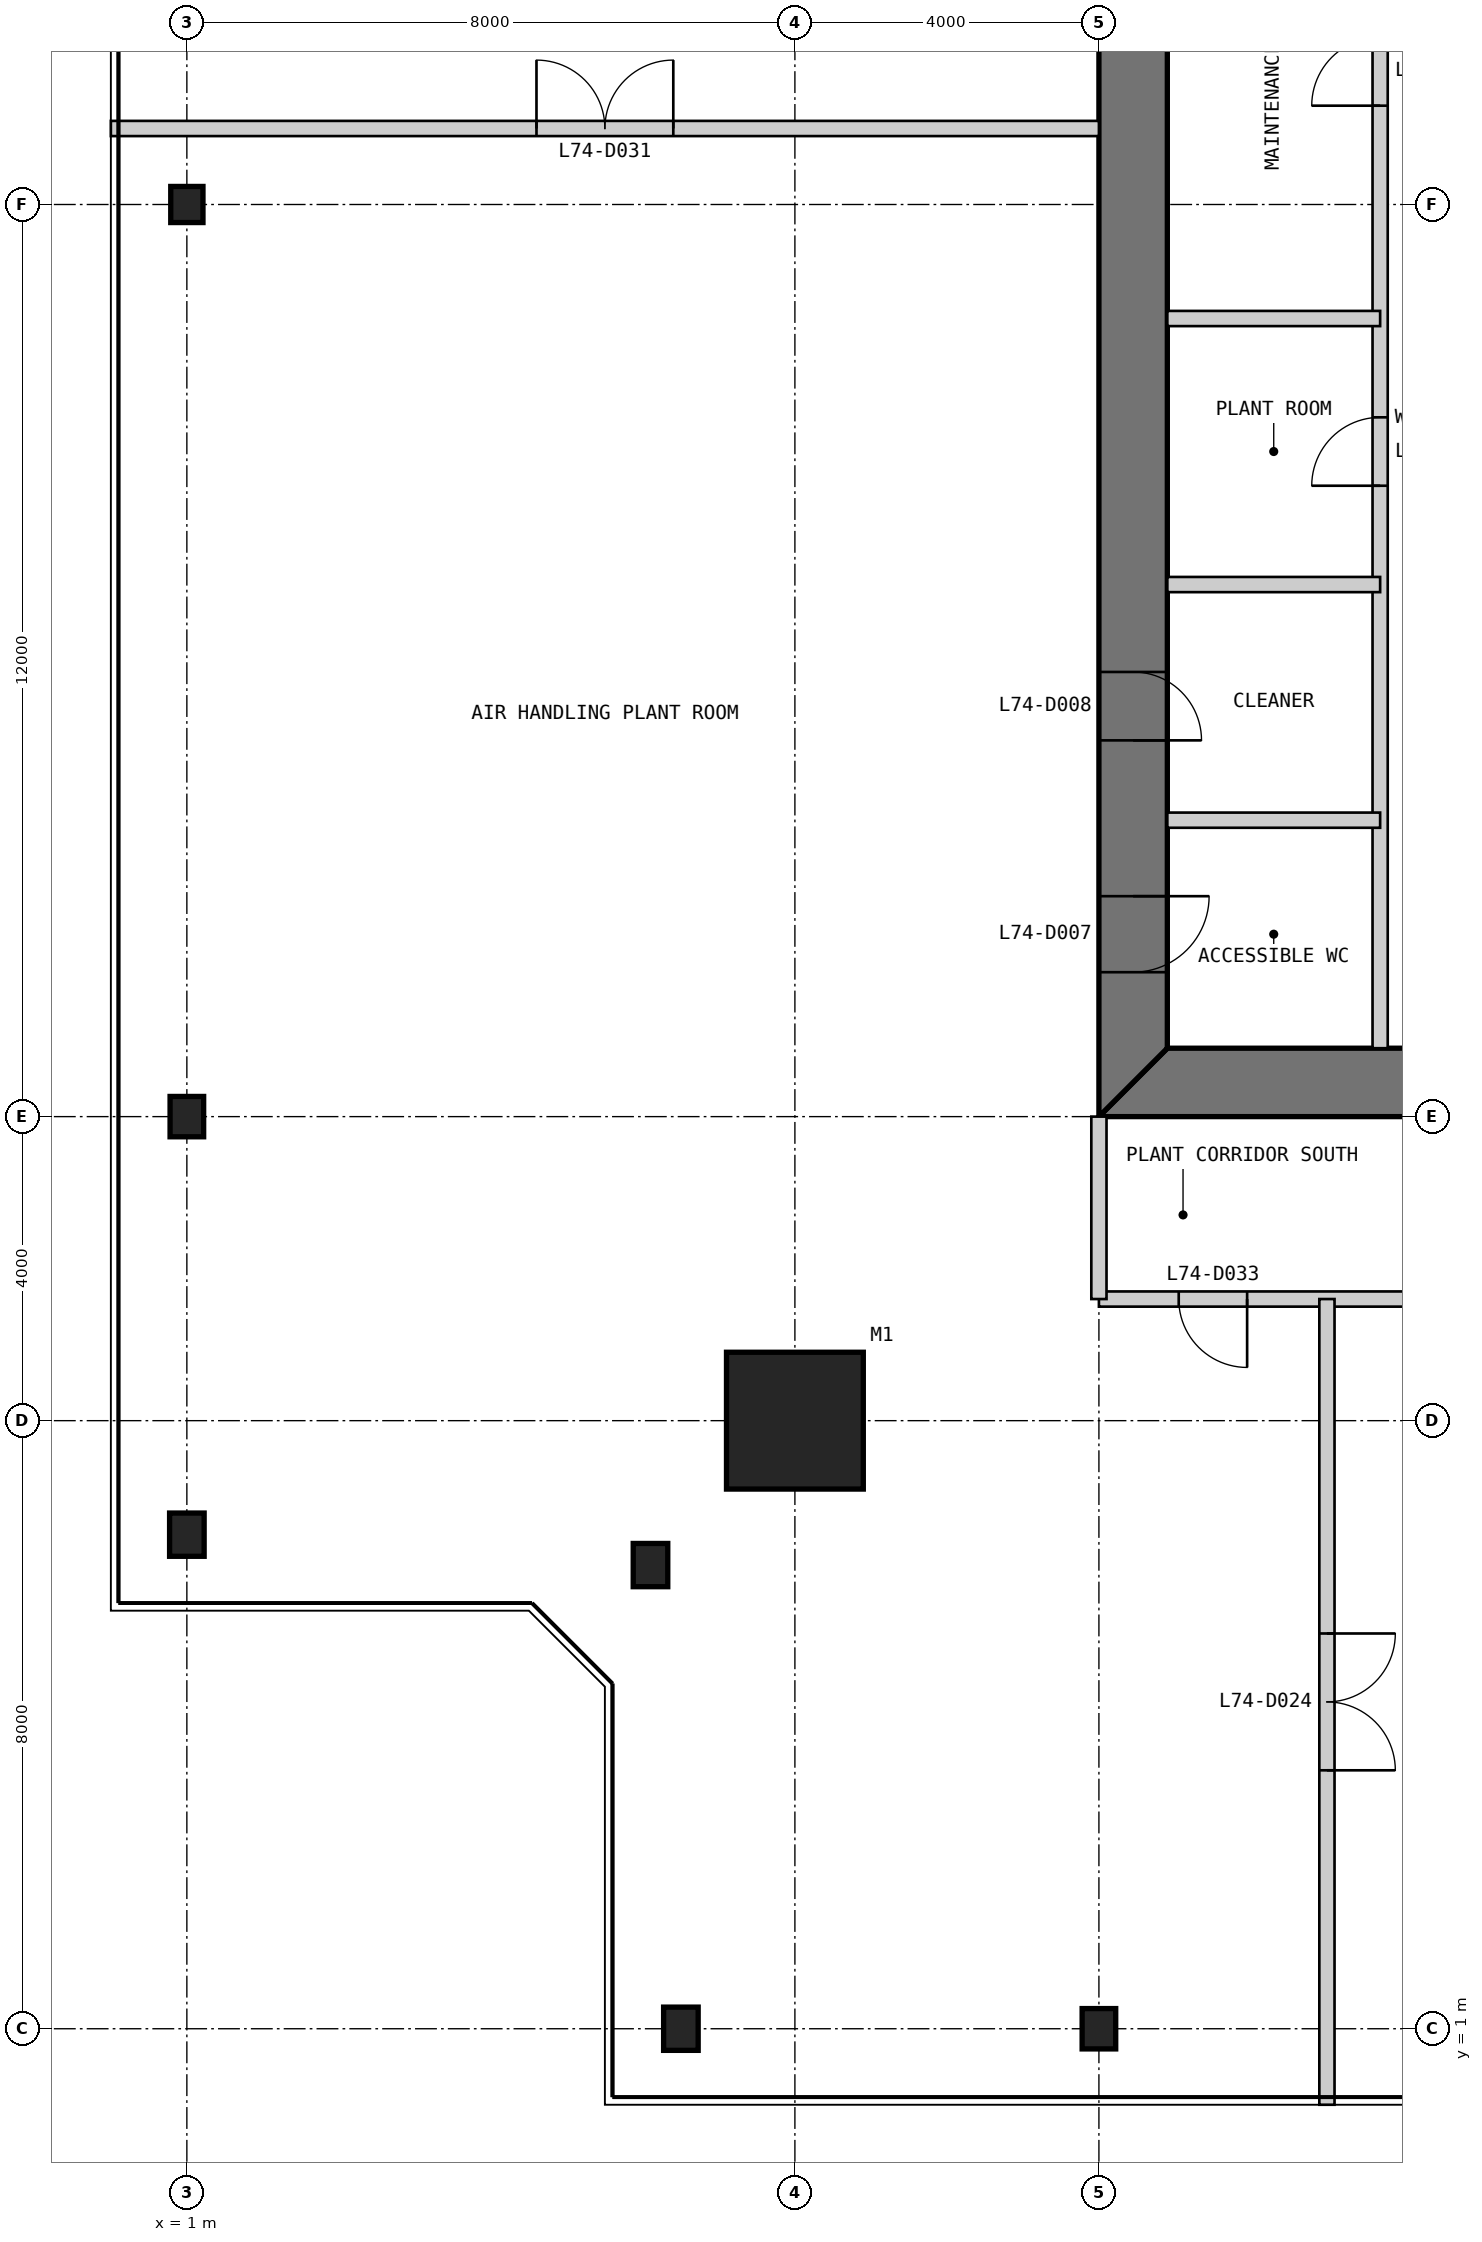
"""IFC4 building model, lengths in metres.
Left out: names, types, materials, properties, quantities, classifications, styles, units other than length and angle.
Written with IfcOpenShell. Run it as: python <this file> out.ifc"""

import sys

from ifc_helpers import new_model, si_unit, direction, frame, frame_2d, origin, origin_2d, place, context, subcontext, project, spatial, polyline, rectangle, i_section, outline, extrude, element, fill, save


model = new_model("IFC4")
c1 = context("Model", 3, precision=1e-05, world=origin(), true_north=direction((0.0, 1.0)))
c2 = subcontext(c1, "Body", "Model", "MODEL_VIEW")
j1 = project(units=[si_unit("LENGTHUNIT", "METRE"), si_unit("PLANEANGLEUNIT", "RADIAN")], contexts=[c1])
p1 = place(None, origin())
s1 = spatial("IfcSite", under=j1, at=p1, CompositionType="ELEMENT")
p2 = place(p1, origin())
s2 = spatial("IfcBuilding", under=s1, at=p2, CompositionType="ELEMENT")
p3 = place(p2, frame((0.0, 0.0, 307.8)))
s3 = spatial("IfcBuildingStorey", under=s2, at=p3, CompositionType="ELEMENT", Elevation=307.8)
p4 = place(p3, frame((9.0, 9.0, 0.0), z_axis=(0.0, 0.0, 1.0), x_axis=(1.0, 0.0, 0.0)))
e1 = element("IfcColumn", 1, at=p4, inside=s3, PredefinedType="COLUMN", context=c2, shape_type="SweptSolid", body=[
    extrude(rectangle(XDim=1.8, YDim=1.8, at=origin_2d()), origin(), (0.0, 0.0, 1.0), 5.75),
])
p5 = place(p3, frame((7.5, 1.0, 0.0), z_axis=(0.0, 0.0, 1.0), x_axis=(1.0, 0.0, 0.0)))
e2 = element("IfcColumn", 2, at=p5, inside=s3, PredefinedType="COLUMN", context=c2, shape_type="SweptSolid", body=[
    extrude(i_section(OverallWidth=0.455, OverallDepth=0.569, WebThickness=0.078, FlangeThickness=0.125, at=origin_2d()), origin(), (0.0, 0.0, 1.0), 5.75),
])
p6 = place(p3, frame((13.0, 1.0, 0.0), z_axis=(0.0, 0.0, 1.0), x_axis=(1.0, 0.0, 0.0)))
e3 = element("IfcColumn", 3, at=p6, inside=s3, PredefinedType="COLUMN", context=c2, shape_type="SweptSolid", body=[
    extrude(i_section(OverallWidth=0.442, OverallDepth=0.531, WebThickness=0.066, FlangeThickness=0.106, at=origin_2d()), origin(), (0.0, 0.0, 1.0), 5.75),
])
p7 = place(p3, frame((1.0, 25.0, 0.0), z_axis=(0.0, 0.0, 1.0), x_axis=(1.0, 0.0, 0.0)))
e4 = element("IfcColumn", 4, at=p7, inside=s3, PredefinedType="COLUMN", context=c2, shape_type="SweptSolid", body=[
    extrude(i_section(OverallWidth=0.424, OverallDepth=0.475, WebThickness=0.048, FlangeThickness=0.077, at=origin_2d()), origin(), (0.0, 0.0, 1.0), 5.75),
])
p8 = place(p3, frame((1.0, 13.0, 0.0), z_axis=(0.0, 0.0, 1.0), x_axis=(1.0, 0.0, 0.0)))
e5 = element("IfcColumn", 5, at=p8, inside=s3, PredefinedType="COLUMN", context=c2, shape_type="SweptSolid", body=[
    extrude(i_section(OverallWidth=0.442, OverallDepth=0.531, WebThickness=0.066, FlangeThickness=0.106, at=origin_2d()), origin(), (0.0, 0.0, 1.0), 5.75),
])
for number, where, z_axis, x_axis in (
    (6, (1.0, 7.5, 0.0), (0.0, 0.0, 1.0), (1.0, 0.0, 0.0)),
    (7, (7.1, 7.1, 0.0), (0.0, 0.0, 1.0), (1.0, 0.0, 0.0)),
):
    element("IfcColumn", number, at=place(p3, frame(where, z_axis=z_axis, x_axis=x_axis)), inside=s3, PredefinedType="COLUMN", context=c2, shape_type="SweptSolid", body=[
        extrude(i_section(OverallWidth=0.455, OverallDepth=0.569, WebThickness=0.078, FlangeThickness=0.125, at=origin_2d()), origin(), (0.0, 0.0, 1.0), 5.75),
    ])
p9 = place(p3, frame((13.0, 13.45, 0.0), z_axis=(0.0, 0.0, 1.0), x_axis=(1.0, 0.0, 0.0)))
e8 = element("IfcWall", 8, at=p9, inside=s3, PredefinedType="SHEAR", context=c2, shape_type="SweptSolid", body=[
    extrude(outline(polyline([(0.0, -0.45), (24.0, -0.45), (23.1, 0.45), (0.9, 0.45), (0.0, -0.45)])), origin(), (0.0, 0.0, 1.0), 5.75),
])
p10 = place(p9, frame((4.9, 0.0, 0.0)))
e9 = element("IfcOpeningElement", 9, at=p10, cuts=e8, PredefinedType="OPENING", context=c2, shape_type="SweptSolid", body=[
    extrude(rectangle(XDim=1.0, YDim=2.2, at=frame_2d((0.5, 1.1))), frame((0.0, 0.46, 0.0), z_axis=(0.0, -1.0, 0.0), x_axis=(1.0, 0.0, 0.0)), (0.0, 0.0, 1.0), 0.92),
])
p11 = place(p9, frame((8.9, 0.0, 0.0)))
e10 = element("IfcOpeningElement", 10, at=p11, cuts=e8, PredefinedType="OPENING", context=c2, shape_type="SweptSolid", body=[
    extrude(rectangle(XDim=1.1, YDim=2.2, at=frame_2d((0.55, 1.1))), frame((0.0, 0.46, 0.0), z_axis=(0.0, -1.0, 0.0), x_axis=(1.0, 0.0, 0.0)), (0.0, 0.0, 1.0), 0.92),
])
p12 = place(p9, frame((15.05, 0.0, 0.0)))
e11 = element("IfcOpeningElement", 11, at=p12, cuts=e8, PredefinedType="OPENING", context=c2, shape_type="SweptSolid", body=[
    extrude(rectangle(XDim=0.9, YDim=2.2, at=frame_2d((0.45, 1.1))), frame((0.0, 0.46, 0.0), z_axis=(0.0, -1.0, 0.0), x_axis=(1.0, 0.0, 0.0)), (0.0, 0.0, 1.0), 0.92),
])
p13 = place(p9, frame((17.9, 0.0, 0.0)))
e12 = element("IfcOpeningElement", 12, at=p13, cuts=e8, PredefinedType="OPENING", context=c2, shape_type="SweptSolid", body=[
    extrude(rectangle(XDim=1.0, YDim=2.2, at=frame_2d((0.5, 1.1))), frame((0.0, 0.46, 0.0), z_axis=(0.0, -1.0, 0.0), x_axis=(1.0, 0.0, 0.0)), (0.0, 0.0, 1.0), 0.92),
])
p14 = place(p9, frame((21.4, 0.0, 0.0)))
e13 = element("IfcOpeningElement", 13, at=p14, cuts=e8, PredefinedType="OPENING", context=c2, shape_type="SweptSolid", body=[
    extrude(rectangle(XDim=1.0, YDim=2.2, at=frame_2d((0.5, 1.1))), frame((0.0, 0.46, 0.0), z_axis=(0.0, -1.0, 0.0), x_axis=(1.0, 0.0, 0.0)), (0.0, 0.0, 1.0), 0.92),
])
p15 = place(p3, frame((13.45, 36.1, 0.0), z_axis=(0.0, 0.0, 1.0), x_axis=(0.0, -1.0, 0.0)))
e14 = element("IfcWall", 14, at=p15, inside=s3, PredefinedType="SHEAR", context=c2, shape_type="SweptSolid", body=[
    extrude(outline(polyline([(-0.9, -0.45), (23.1, -0.45), (22.2, 0.45), (0.0, 0.45), (-0.9, -0.45)])), origin(), (0.0, 0.0, 1.0), 5.75),
])
p16 = place(p15, frame((20.2, 0.0, 0.0)))
e15 = element("IfcOpeningElement", 15, at=p16, cuts=e14, PredefinedType="OPENING", context=c2, shape_type="SweptSolid", body=[
    extrude(rectangle(XDim=1.0, YDim=2.2, at=frame_2d((0.5, 1.1))), frame((0.0, 0.46, 0.0), z_axis=(0.0, -1.0, 0.0), x_axis=(1.0, 0.0, 0.0)), (0.0, 0.0, 1.0), 0.92),
])
p17 = place(p15, frame((17.25, 0.0, 0.0)))
e16 = element("IfcOpeningElement", 16, at=p17, cuts=e14, PredefinedType="OPENING", context=c2, shape_type="SweptSolid", body=[
    extrude(rectangle(XDim=0.9, YDim=2.2, at=frame_2d((0.45, 1.1))), frame((0.0, 0.46, 0.0), z_axis=(0.0, -1.0, 0.0), x_axis=(1.0, 0.0, 0.0)), (0.0, 0.0, 1.0), 0.92),
])
p18 = place(p3, frame((16.7, 13.9, 0.0), z_axis=(0.0, 0.0, 1.0), x_axis=(0.0, 1.0, 0.0)))
e17 = element("IfcWall", 17, at=p18, inside=s3, PredefinedType="PARTITIONING", context=c2, shape_type="SweptSolid", body=[
    extrude(rectangle(XDim=16.1, YDim=0.2, at=frame_2d((8.05, 0.0))), origin(), (0.0, 0.0, 1.0), 5.75),
])
p19 = place(p18, frame((7.4, 0.0, 0.0)))
e18 = element("IfcOpeningElement", 18, at=p19, cuts=e17, PredefinedType="OPENING", context=c2, shape_type="SweptSolid", body=[
    extrude(rectangle(XDim=0.9, YDim=2.2, at=frame_2d((0.45, 1.1))), frame((0.0, 0.11, 0.0), z_axis=(0.0, -1.0, 0.0), x_axis=(1.0, 0.0, 0.0)), (0.0, 0.0, 1.0), 0.22),
])
p20 = place(p18, frame((12.4, 0.0, 0.0)))
e19 = element("IfcOpeningElement", 19, at=p20, cuts=e17, PredefinedType="OPENING", context=c2, shape_type="SweptSolid", body=[
    extrude(rectangle(XDim=0.9, YDim=2.2, at=frame_2d((0.45, 1.1))), frame((0.0, 0.11, 0.0), z_axis=(0.0, -1.0, 0.0), x_axis=(1.0, 0.0, 0.0)), (0.0, 0.0, 1.0), 0.22),
])
for number, where, z_axis, x_axis in (
    (20, (13.9, 16.9, 0.0), (0.0, 0.0, 1.0), (1.0, 0.0, 0.0)),
    (21, (13.9, 20.0, 0.0), (0.0, 0.0, 1.0), (1.0, 0.0, 0.0)),
    (22, (13.9, 23.5, 0.0), (0.0, 0.0, 1.0), (1.0, 0.0, 0.0)),
):
    element("IfcWall", number, at=place(p3, frame(where, z_axis=z_axis, x_axis=x_axis)), inside=s3, PredefinedType="PARTITIONING", context=c2, shape_type="SweptSolid", body=[
        extrude(rectangle(XDim=2.8, YDim=0.2, at=frame_2d((1.4, 0.0))), origin(), (0.0, 0.0, 1.0), 5.75),
    ])
p21 = place(p3, frame((13.0, 10.6, 0.0), z_axis=(0.0, 0.0, 1.0), x_axis=(1.0, 0.0, 0.0)))
e23 = element("IfcWall", 23, at=p21, inside=s3, PredefinedType="PARTITIONING", context=c2, shape_type="SweptSolid", body=[
    extrude(rectangle(XDim=24.0, YDim=0.2, at=frame_2d((12.0, 0.0))), origin(), (0.0, 0.0, 1.0), 5.75),
])
p22 = place(p21, frame((1.05, 0.0, 0.0)))
e24 = element("IfcOpeningElement", 24, at=p22, cuts=e23, PredefinedType="OPENING", context=c2, shape_type="SweptSolid", body=[
    extrude(rectangle(XDim=0.9, YDim=2.2, at=frame_2d((0.45, 1.1))), frame((0.0, 0.11, 0.0), z_axis=(0.0, -1.0, 0.0), x_axis=(1.0, 0.0, 0.0)), (0.0, 0.0, 1.0), 0.22),
])
p23 = place(p21, frame((7.1, 0.0, 0.0)))
e25 = element("IfcOpeningElement", 25, at=p23, cuts=e23, PredefinedType="OPENING", context=c2, shape_type="SweptSolid", body=[
    extrude(rectangle(XDim=1.8, YDim=2.4, at=frame_2d((0.9, 1.2))), frame((0.0, 0.11, 0.0), z_axis=(0.0, -1.0, 0.0), x_axis=(1.0, 0.0, 0.0)), (0.0, 0.0, 1.0), 0.22),
])
p24 = place(p21, frame((15.6, 0.0, 0.0)))
e26 = element("IfcOpeningElement", 26, at=p24, cuts=e23, PredefinedType="OPENING", context=c2, shape_type="SweptSolid", body=[
    extrude(rectangle(XDim=1.8, YDim=2.4, at=frame_2d((0.9, 1.2))), frame((0.0, 0.11, 0.0), z_axis=(0.0, -1.0, 0.0), x_axis=(1.0, 0.0, 0.0)), (0.0, 0.0, 1.0), 0.22),
])
p25 = place(p21, frame((21.1, 0.0, 0.0)))
e27 = element("IfcOpeningElement", 27, at=p25, cuts=e23, PredefinedType="OPENING", context=c2, shape_type="SweptSolid", body=[
    extrude(rectangle(XDim=1.8, YDim=2.4, at=frame_2d((0.9, 1.2))), frame((0.0, 0.11, 0.0), z_axis=(0.0, -1.0, 0.0), x_axis=(1.0, 0.0, 0.0)), (0.0, 0.0, 1.0), 0.22),
])
p26 = place(p3, frame((13.0, 10.6, 0.0), z_axis=(0.0, 0.0, 1.0), x_axis=(0.0, 1.0, 0.0)))
e28 = element("IfcWall", 28, at=p26, inside=s3, PredefinedType="PARTITIONING", context=c2, shape_type="SweptSolid", body=[
    extrude(rectangle(XDim=2.4, YDim=0.2, at=frame_2d((1.2, 0.0))), origin(), (0.0, 0.0, 1.0), 4.802),
])
p27 = place(p3, frame((16.0, 0.0, 0.0), z_axis=(0.0, 0.0, 1.0), x_axis=(0.0, 1.0, 0.0)))
e29 = element("IfcWall", 29, at=p27, inside=s3, PredefinedType="PARTITIONING", context=c2, shape_type="SweptSolid", body=[
    extrude(rectangle(XDim=10.6, YDim=0.2, at=frame_2d((5.3, 0.0))), origin(), (0.0, 0.0, 1.0), 4.904),
])
p28 = place(p27, frame((4.4, 0.0, 0.0)))
e30 = element("IfcOpeningElement", 30, at=p28, cuts=e29, PredefinedType="OPENING", context=c2, shape_type="SweptSolid", body=[
    extrude(rectangle(XDim=1.8, YDim=2.4, at=frame_2d((0.9, 1.2))), frame((0.0, 0.11, 0.0), z_axis=(0.0, -1.0, 0.0), x_axis=(1.0, 0.0, 0.0)), (0.0, 0.0, 1.0), 0.22),
])
p29 = place(p3, frame((0.0, 26.0, 0.0), z_axis=(0.0, 0.0, 1.0), x_axis=(1.0, 0.0, 0.0)))
e31 = element("IfcWall", 31, at=p29, inside=s3, PredefinedType="PARTITIONING", context=c2, shape_type="SweptSolid", body=[
    extrude(rectangle(XDim=13.0, YDim=0.2, at=frame_2d((6.5, 0.0))), origin(), (0.0, 0.0, 1.0), 5.75),
])
p30 = place(p29, frame((5.6, 0.0, 0.0)))
e32 = element("IfcOpeningElement", 32, at=p30, cuts=e31, PredefinedType="OPENING", context=c2, shape_type="SweptSolid", body=[
    extrude(rectangle(XDim=1.8, YDim=2.4, at=frame_2d((0.9, 1.2))), frame((0.0, 0.11, 0.0), z_axis=(0.0, -1.0, 0.0), x_axis=(1.0, 0.0, 0.0)), (0.0, 0.0, 1.0), 0.22),
])
p31 = place(p16, origin())
e33 = element("IfcDoor", 33, at=p31, inside=s3, OperationType="SINGLE_SWING_LEFT", PredefinedType="DOOR", context=c2, shape_type="SweptSolid", body=[
    extrude(rectangle(XDim=1.0, YDim=2.2, at=frame_2d((0.5, 1.1))), frame((0.0, 0.025, 0.0), z_axis=(0.0, -1.0, 0.0), x_axis=(1.0, 0.0, 0.0)), (0.0, 0.0, 1.0), 0.05),
    extrude(outline(polyline([(0.0, 0.0), (0.04, 0.0), (0.04, 2.16), (0.96, 2.16), (0.96, 0.0), (1.0, 0.0), (1.0, 2.2), (0.0, 2.2), (0.0, 0.0)])), frame((0.0, 0.3, 0.0), z_axis=(0.0, -1.0, 0.0), x_axis=(1.0, 0.0, 0.0)), (0.0, 0.0, 1.0), 0.6),
])
fill(e15, e33)
p32 = place(p17, origin())
e34 = element("IfcDoor", 34, at=p32, inside=s3, OperationType="SINGLE_SWING_RIGHT", PredefinedType="DOOR", context=c2, shape_type="SweptSolid", body=[
    extrude(rectangle(XDim=0.9, YDim=2.2, at=frame_2d((0.45, 1.1))), frame((0.0, 0.025, 0.0), z_axis=(0.0, -1.0, 0.0), x_axis=(1.0, 0.0, 0.0)), (0.0, 0.0, 1.0), 0.05),
    extrude(outline(polyline([(0.0, 0.0), (0.04, 0.0), (0.04, 2.16), (0.86, 2.16), (0.86, 0.0), (0.9, 0.0), (0.9, 2.2), (0.0, 2.2), (0.0, 0.0)])), frame((0.0, 0.3, 0.0), z_axis=(0.0, -1.0, 0.0), x_axis=(1.0, 0.0, 0.0)), (0.0, 0.0, 1.0), 0.6),
])
fill(e16, e34)
p33 = place(p19, origin())
e35 = element("IfcDoor", 35, at=p33, inside=s3, OperationType="SINGLE_SWING_LEFT", PredefinedType="DOOR", context=c2, shape_type="SweptSolid", body=[
    extrude(rectangle(XDim=0.9, YDim=2.2, at=frame_2d((0.45, 1.1))), frame((0.0, 0.025, 0.0), z_axis=(0.0, -1.0, 0.0), x_axis=(1.0, 0.0, 0.0)), (0.0, 0.0, 1.0), 0.05),
])
fill(e18, e35)
p34 = place(p20, origin())
e36 = element("IfcDoor", 36, at=p34, inside=s3, OperationType="SINGLE_SWING_LEFT", PredefinedType="DOOR", context=c2, shape_type="SweptSolid", body=[
    extrude(rectangle(XDim=0.9, YDim=2.2, at=frame_2d((0.45, 1.1))), frame((0.0, 0.025, 0.0), z_axis=(0.0, -1.0, 0.0), x_axis=(1.0, 0.0, 0.0)), (0.0, 0.0, 1.0), 0.05),
])
fill(e19, e36)
p35 = place(p28, frame((1.8, 0.0, 0.0), z_axis=(0.0, 0.0, 1.0), x_axis=(-1.0, 0.0, 0.0)))
e37 = element("IfcDoor", 37, at=p35, inside=s3, OperationType="DOUBLE_DOOR_SINGLE_SWING", PredefinedType="DOOR", context=c2, shape_type="SweptSolid", body=[
    extrude(rectangle(XDim=1.8, YDim=2.4, at=frame_2d((0.9, 1.2))), frame((0.0, 0.025, 0.0), z_axis=(0.0, -1.0, 0.0), x_axis=(1.0, 0.0, 0.0)), (0.0, 0.0, 1.0), 0.05),
])
fill(e30, e37)
p36 = place(p30, origin())
e38 = element("IfcDoor", 38, at=p36, inside=s3, OperationType="DOUBLE_DOOR_SINGLE_SWING", PredefinedType="DOOR", context=c2, shape_type="SweptSolid", body=[
    extrude(rectangle(XDim=1.8, YDim=2.4, at=frame_2d((0.9, 1.2))), frame((0.0, 0.025, 0.0), z_axis=(0.0, -1.0, 0.0), x_axis=(1.0, 0.0, 0.0)), (0.0, 0.0, 1.0), 0.05),
])
fill(e32, e38)
p37 = place(p22, frame((0.9, 0.0, 0.0), z_axis=(0.0, 0.0, 1.0), x_axis=(-1.0, 0.0, 0.0)))
e39 = element("IfcDoor", 39, at=p37, inside=s3, OperationType="SINGLE_SWING_LEFT", PredefinedType="DOOR", context=c2, shape_type="SweptSolid", body=[
    extrude(rectangle(XDim=0.9, YDim=2.2, at=frame_2d((0.45, 1.1))), frame((0.0, 0.025, 0.0), z_axis=(0.0, -1.0, 0.0), x_axis=(1.0, 0.0, 0.0)), (0.0, 0.0, 1.0), 0.05),
])
fill(e24, e39)
save(model, sys.argv[1])
